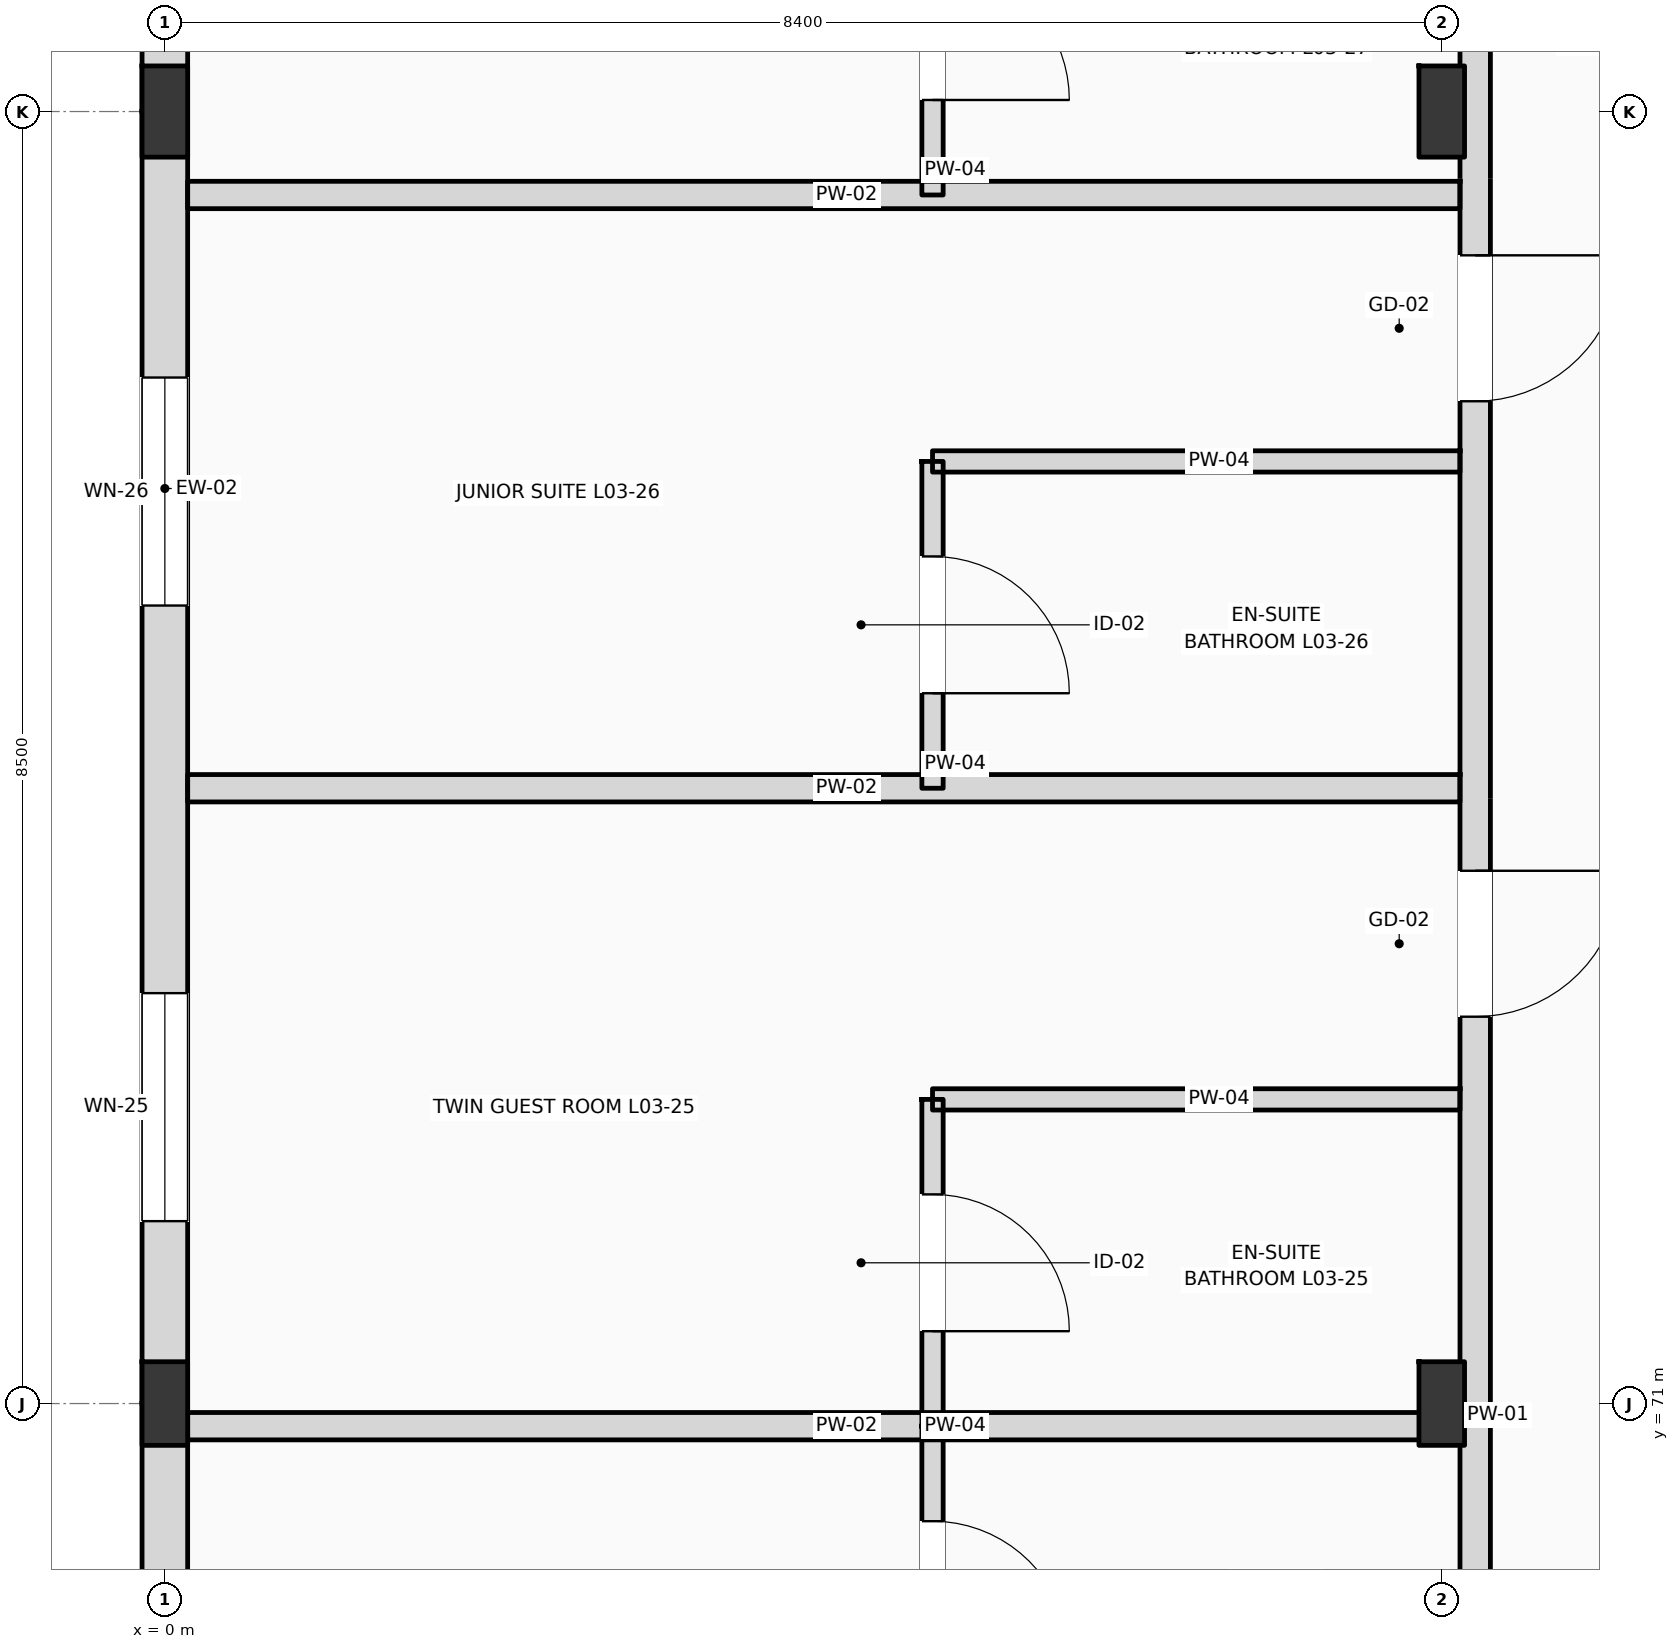
"""IFC4 building model, lengths in metres.
Left out: names, types, materials, properties, quantities, classifications, styles, units other than length and angle.
Written with IfcOpenShell. Run it as: python <this file> out.ifc"""

import sys

from ifc_helpers import new_model, si_unit, direction, frame, frame_2d, origin, origin_2d, place, context, subcontext, project, spatial, rectangle, i_section, extrude, element, fill, save


model = new_model("IFC4")
c1 = context("Model", 3, precision=1e-05, world=origin(), true_north=direction((0.0, 1.0)))
c2 = subcontext(c1, "Body", "Model", "MODEL_VIEW")
j1 = project(units=[si_unit("LENGTHUNIT", "METRE"), si_unit("PLANEANGLEUNIT", "RADIAN")], contexts=[c1])
p1 = place(None, origin())
s1 = spatial("IfcSite", under=j1, at=p1, CompositionType="ELEMENT")
p2 = place(p1, origin())
s2 = spatial("IfcBuilding", under=s1, at=p2, CompositionType="ELEMENT")
p3 = place(p2, frame((0.0, 0.0, 16.2)))
s3 = spatial("IfcBuildingStorey", under=s2, at=p3, CompositionType="ELEMENT", Elevation=16.2)
p4 = place(p3, frame((0.0, 71.0, 0.0), z_axis=(0.0, 0.0, 1.0), x_axis=(1.0, 0.0, 0.0)))
e1 = element("IfcColumn", 1, at=p4, inside=s3, PredefinedType="COLUMN", context=c2, shape_type="SweptSolid", body=[
    extrude(i_section(OverallWidth=0.3, OverallDepth=0.55, WebThickness=0.015, FlangeThickness=0.029, FilletRadius=0.027, at=origin_2d()), origin(), (0.0, 0.0, 1.0), 4.2),
])
p5 = place(p3, frame((0.0, 79.5, 0.0), z_axis=(0.0, 0.0, 1.0), x_axis=(1.0, 0.0, 0.0)))
e2 = element("IfcColumn", 2, at=p5, inside=s3, PredefinedType="COLUMN", context=c2, shape_type="SweptSolid", body=[
    extrude(i_section(OverallWidth=0.3, OverallDepth=0.6, WebThickness=0.015, FlangeThickness=0.03, FilletRadius=0.027, at=origin_2d()), origin(), (0.0, 0.0, 1.0), 4.2),
])
p6 = place(p3, frame((8.4, 71.0, 0.0), z_axis=(0.0, 0.0, 1.0), x_axis=(1.0, 0.0, 0.0)))
e3 = element("IfcColumn", 3, at=p6, inside=s3, PredefinedType="COLUMN", context=c2, shape_type="SweptSolid", body=[
    extrude(i_section(OverallWidth=0.3, OverallDepth=0.55, WebThickness=0.015, FlangeThickness=0.029, FilletRadius=0.027, at=origin_2d()), origin(), (0.0, 0.0, 1.0), 4.2),
])
p7 = place(p3, frame((8.4, 79.5, 0.0), z_axis=(0.0, 0.0, 1.0), x_axis=(1.0, 0.0, 0.0)))
e4 = element("IfcColumn", 4, at=p7, inside=s3, PredefinedType="COLUMN", context=c2, shape_type="SweptSolid", body=[
    extrude(i_section(OverallWidth=0.3, OverallDepth=0.6, WebThickness=0.015, FlangeThickness=0.03, FilletRadius=0.027, at=origin_2d()), origin(), (0.0, 0.0, 1.0), 4.2),
])
p8 = place(p3, frame((0.0, 62.5, 0.0), z_axis=(0.0, 0.0, 1.0), x_axis=(0.0, 1.0, 0.0)))
e5 = element("IfcWall", 5, at=p8, inside=s3, PredefinedType="STANDARD", context=c2, shape_type="SweptSolid", body=[
    extrude(rectangle(XDim=8.5, YDim=0.3, at=frame_2d((4.25, 0.0))), origin(), (0.0, 0.0, 1.0), 3.51),
])
p9 = place(p8, frame((1.674, 0.0, 0.9)))
e6 = element("IfcOpeningElement", 6, at=p9, cuts=e5, PredefinedType="OPENING", context=c2, shape_type="SweptSolid", body=[
    extrude(rectangle(XDim=1.4, YDim=1.7, at=frame_2d((0.7, 0.85))), frame((0.0, 0.16, 0.0), z_axis=(0.0, -1.0, 0.0), x_axis=(1.0, 0.0, 0.0)), (0.0, 0.0, 1.0), 0.32),
])
p10 = place(p8, frame((5.649, 0.0, 0.9)))
e7 = element("IfcOpeningElement", 7, at=p10, cuts=e5, PredefinedType="OPENING", context=c2, shape_type="SweptSolid", body=[
    extrude(rectangle(XDim=1.5, YDim=1.75, at=frame_2d((0.75, 0.875))), frame((0.0, 0.16, 0.0), z_axis=(0.0, -1.0, 0.0), x_axis=(1.0, 0.0, 0.0)), (0.0, 0.0, 1.0), 0.32),
])
p11 = place(p3, frame((0.0, 71.0, 0.0), z_axis=(0.0, 0.0, 1.0), x_axis=(0.0, 1.0, 0.0)))
e8 = element("IfcWall", 8, at=p11, inside=s3, PredefinedType="STANDARD", context=c2, shape_type="SweptSolid", body=[
    extrude(rectangle(XDim=8.5, YDim=0.3, at=frame_2d((4.25, 0.0))), origin(), (0.0, 0.0, 1.0), 3.51),
])
p12 = place(p11, frame((1.2, 0.0, 0.9)))
e9 = element("IfcOpeningElement", 9, at=p12, cuts=e8, PredefinedType="OPENING", context=c2, shape_type="SweptSolid", body=[
    extrude(rectangle(XDim=1.5, YDim=2.3, at=frame_2d((0.75, 1.15))), frame((0.0, 0.16, 0.0), z_axis=(0.0, -1.0, 0.0), x_axis=(1.0, 0.0, 0.0)), (0.0, 0.0, 1.0), 0.32),
])
p13 = place(p11, frame((5.25, 0.0, 0.9)))
e10 = element("IfcOpeningElement", 10, at=p13, cuts=e8, PredefinedType="OPENING", context=c2, shape_type="SweptSolid", body=[
    extrude(rectangle(XDim=1.5, YDim=2.43, at=frame_2d((0.75, 1.215))), frame((0.0, 0.16, 0.0), z_axis=(0.0, -1.0, 0.0), x_axis=(1.0, 0.0, 0.0)), (0.0, 0.0, 1.0), 0.32),
])
p14 = place(p3, frame((0.0, 79.5, 0.0), z_axis=(0.0, 0.0, 1.0), x_axis=(0.0, 1.0, 0.0)))
e11 = element("IfcWall", 11, at=p14, inside=s3, PredefinedType="STANDARD", context=c2, shape_type="SweptSolid", body=[
    extrude(rectangle(XDim=8.5, YDim=0.3, at=frame_2d((4.25, 0.0))), origin(), (0.0, 0.0, 1.0), 3.51),
])
p15 = place(p14, frame((0.799, 0.0, 0.9)))
e12 = element("IfcOpeningElement", 12, at=p15, cuts=e11, PredefinedType="OPENING", context=c2, shape_type="SweptSolid", body=[
    extrude(rectangle(XDim=1.5, YDim=2.43, at=frame_2d((0.75, 1.215))), frame((0.0, 0.16, 0.0), z_axis=(0.0, -1.0, 0.0), x_axis=(1.0, 0.0, 0.0)), (0.0, 0.0, 1.0), 0.32),
])
p16 = place(p14, frame((4.85, 0.0, 0.9)))
e13 = element("IfcOpeningElement", 13, at=p16, cuts=e11, PredefinedType="OPENING", context=c2, shape_type="SweptSolid", body=[
    extrude(rectangle(XDim=1.5, YDim=2.43, at=frame_2d((0.75, 1.215))), frame((0.0, 0.16, 0.0), z_axis=(0.0, -1.0, 0.0), x_axis=(1.0, 0.0, 0.0)), (0.0, 0.0, 1.0), 0.32),
])
p17 = place(p3, frame((8.62, 62.64, 0.0), z_axis=(0.0, 0.0, 1.0), x_axis=(0.0, 1.0, 0.0)))
e14 = element("IfcWall", 14, at=p17, inside=s3, PredefinedType="PARTITIONING", context=c2, shape_type="SweptSolid", body=[
    extrude(rectangle(XDim=32.66, YDim=0.2, at=frame_2d((16.33, 0.0))), origin(), (0.0, 0.0, 1.0), 3.51),
])
p18 = place(p17, frame((2.829, 0.0, 0.0)))
e15 = element("IfcOpeningElement", 15, at=p18, cuts=e14, PredefinedType="OPENING", context=c2, shape_type="SweptSolid", body=[
    extrude(rectangle(XDim=0.96, YDim=2.2, at=frame_2d((0.48, 1.1))), frame((0.0, 0.11, 0.0), z_axis=(0.0, -1.0, 0.0), x_axis=(1.0, 0.0, 0.0)), (0.0, 0.0, 1.0), 0.22),
])
p19 = place(p17, frame((4.704, 0.0, 0.0)))
e16 = element("IfcOpeningElement", 16, at=p19, cuts=e14, PredefinedType="OPENING", context=c2, shape_type="SweptSolid", body=[
    extrude(rectangle(XDim=0.96, YDim=2.2, at=frame_2d((0.48, 1.1))), frame((0.0, 0.11, 0.0), z_axis=(0.0, -1.0, 0.0), x_axis=(1.0, 0.0, 0.0)), (0.0, 0.0, 1.0), 0.22),
])
p20 = place(p17, frame((10.905, 0.0, 0.0)))
e17 = element("IfcOpeningElement", 17, at=p20, cuts=e14, PredefinedType="OPENING", context=c2, shape_type="SweptSolid", body=[
    extrude(rectangle(XDim=0.96, YDim=2.2, at=frame_2d((0.48, 1.1))), frame((0.0, 0.11, 0.0), z_axis=(0.0, -1.0, 0.0), x_axis=(1.0, 0.0, 0.0)), (0.0, 0.0, 1.0), 0.22),
])
p21 = place(p17, frame((14.954, 0.0, 0.0)))
e18 = element("IfcOpeningElement", 18, at=p21, cuts=e14, PredefinedType="OPENING", context=c2, shape_type="SweptSolid", body=[
    extrude(rectangle(XDim=0.96, YDim=2.2, at=frame_2d((0.48, 1.1))), frame((0.0, 0.11, 0.0), z_axis=(0.0, -1.0, 0.0), x_axis=(1.0, 0.0, 0.0)), (0.0, 0.0, 1.0), 0.22),
])
p22 = place(p17, frame((19.004, 0.0, 0.0)))
e19 = element("IfcOpeningElement", 19, at=p22, cuts=e14, PredefinedType="OPENING", context=c2, shape_type="SweptSolid", body=[
    extrude(rectangle(XDim=0.96, YDim=2.2, at=frame_2d((0.48, 1.1))), frame((0.0, 0.11, 0.0), z_axis=(0.0, -1.0, 0.0), x_axis=(1.0, 0.0, 0.0)), (0.0, 0.0, 1.0), 0.22),
])
p23 = place(p17, frame((23.055, 0.0, 0.0)))
e20 = element("IfcOpeningElement", 20, at=p23, cuts=e14, PredefinedType="OPENING", context=c2, shape_type="SweptSolid", body=[
    extrude(rectangle(XDim=0.96, YDim=2.2, at=frame_2d((0.48, 1.1))), frame((0.0, 0.11, 0.0), z_axis=(0.0, -1.0, 0.0), x_axis=(1.0, 0.0, 0.0)), (0.0, 0.0, 1.0), 0.22),
])
p24 = place(p17, frame((27.104, 0.0, 0.0)))
e21 = element("IfcOpeningElement", 21, at=p24, cuts=e14, PredefinedType="OPENING", context=c2, shape_type="SweptSolid", body=[
    extrude(rectangle(XDim=0.96, YDim=2.2, at=frame_2d((0.48, 1.1))), frame((0.0, 0.11, 0.0), z_axis=(0.0, -1.0, 0.0), x_axis=(1.0, 0.0, 0.0)), (0.0, 0.0, 1.0), 0.22),
])
p25 = place(p17, frame((31.179, 0.0, 0.0)))
e22 = element("IfcOpeningElement", 22, at=p25, cuts=e14, PredefinedType="OPENING", context=c2, shape_type="SweptSolid", body=[
    extrude(rectangle(XDim=0.96, YDim=2.2, at=frame_2d((0.48, 1.1))), frame((0.0, 0.11, 0.0), z_axis=(0.0, -1.0, 0.0), x_axis=(1.0, 0.0, 0.0)), (0.0, 0.0, 1.0), 0.22),
])
p26 = place(p3, frame((0.15, 70.851, 0.0), z_axis=(0.0, 0.0, 1.0), x_axis=(1.0, 0.0, 0.0)))
e23 = element("IfcWall", 23, at=p26, inside=s3, PredefinedType="PARTITIONING", context=c2, shape_type="SweptSolid", body=[
    extrude(rectangle(XDim=8.37, YDim=0.18, at=frame_2d((4.185, 0.0))), origin(), (0.0, 0.0, 1.0), 3.36),
])
p27 = place(p3, frame((5.05, 68.701, 0.0), z_axis=(0.0, 0.0, 1.0), x_axis=(0.0, 1.0, 0.0)))
e24 = element("IfcWall", 24, at=p27, inside=s3, PredefinedType="PARTITIONING", context=c2, shape_type="SweptSolid", body=[
    extrude(rectangle(XDim=2.15, YDim=0.14, at=frame_2d((1.075, 0.0))), origin(), (0.0, 0.0, 1.0), 3.92),
])
p28 = place(p27, frame((0.625, 0.0, 0.0)))
e25 = element("IfcOpeningElement", 25, at=p28, cuts=e24, PredefinedType="OPENING", context=c2, shape_type="SweptSolid", body=[
    extrude(rectangle(XDim=0.9, YDim=2.1, at=frame_2d((0.45, 1.05))), frame((0.0, 0.08, 0.0), z_axis=(0.0, -1.0, 0.0), x_axis=(1.0, 0.0, 0.0)), (0.0, 0.0, 1.0), 0.16),
])
p29 = place(p3, frame((0.15, 75.048, 0.0), z_axis=(0.0, 0.0, 1.0), x_axis=(1.0, 0.0, 0.0)))
e26 = element("IfcWall", 26, at=p29, inside=s3, PredefinedType="PARTITIONING", context=c2, shape_type="SweptSolid", body=[
    extrude(rectangle(XDim=8.37, YDim=0.18, at=frame_2d((4.185, 0.0))), origin(), (0.0, 0.0, 1.0), 3.92),
])
p30 = place(p3, frame((5.05, 73.001, 0.0), z_axis=(0.0, 0.0, 1.0), x_axis=(1.0, 0.0, 0.0)))
e27 = element("IfcWall", 27, at=p30, inside=s3, PredefinedType="PARTITIONING", context=c2, shape_type="SweptSolid", body=[
    extrude(rectangle(XDim=3.47, YDim=0.14, at=frame_2d((1.735, 0.0))), origin(), (0.0, 0.0, 1.0), 3.92),
])
p31 = place(p3, frame((5.05, 70.851, 0.0), z_axis=(0.0, 0.0, 1.0), x_axis=(0.0, 1.0, 0.0)))
e28 = element("IfcWall", 28, at=p31, inside=s3, PredefinedType="PARTITIONING", context=c2, shape_type="SweptSolid", body=[
    extrude(rectangle(XDim=2.15, YDim=0.14, at=frame_2d((1.075, 0.0))), origin(), (0.0, 0.0, 1.0), 3.92),
])
p32 = place(p31, frame((0.625, 0.0, 0.0)))
e29 = element("IfcOpeningElement", 29, at=p32, cuts=e28, PredefinedType="OPENING", context=c2, shape_type="SweptSolid", body=[
    extrude(rectangle(XDim=0.9, YDim=2.1, at=frame_2d((0.45, 1.05))), frame((0.0, 0.08, 0.0), z_axis=(0.0, -1.0, 0.0), x_axis=(1.0, 0.0, 0.0)), (0.0, 0.0, 1.0), 0.16),
])
p33 = place(p3, frame((0.15, 78.951, 0.0), z_axis=(0.0, 0.0, 1.0), x_axis=(1.0, 0.0, 0.0)))
e30 = element("IfcWall", 30, at=p33, inside=s3, PredefinedType="PARTITIONING", context=c2, shape_type="SweptSolid", body=[
    extrude(rectangle(XDim=8.37, YDim=0.18, at=frame_2d((4.185, 0.0))), origin(), (0.0, 0.0, 1.0), 3.92),
])
p34 = place(p3, frame((5.05, 77.198, 0.0), z_axis=(0.0, 0.0, 1.0), x_axis=(1.0, 0.0, 0.0)))
e31 = element("IfcWall", 31, at=p34, inside=s3, PredefinedType="PARTITIONING", context=c2, shape_type="SweptSolid", body=[
    extrude(rectangle(XDim=3.47, YDim=0.14, at=frame_2d((1.735, 0.0))), origin(), (0.0, 0.0, 1.0), 3.92),
])
p35 = place(p3, frame((5.05, 75.048, 0.0), z_axis=(0.0, 0.0, 1.0), x_axis=(0.0, 1.0, 0.0)))
e32 = element("IfcWall", 32, at=p35, inside=s3, PredefinedType="PARTITIONING", context=c2, shape_type="SweptSolid", body=[
    extrude(rectangle(XDim=2.15, YDim=0.14, at=frame_2d((1.075, 0.0))), origin(), (0.0, 0.0, 1.0), 3.92),
])
p36 = place(p35, frame((0.625, 0.0, 0.0)))
e33 = element("IfcOpeningElement", 33, at=p36, cuts=e32, PredefinedType="OPENING", context=c2, shape_type="SweptSolid", body=[
    extrude(rectangle(XDim=0.9, YDim=2.1, at=frame_2d((0.45, 1.05))), frame((0.0, 0.08, 0.0), z_axis=(0.0, -1.0, 0.0), x_axis=(1.0, 0.0, 0.0)), (0.0, 0.0, 1.0), 0.16),
])
p37 = place(p3, frame((5.05, 78.951, 0.0), z_axis=(0.0, 0.0, 1.0), x_axis=(0.0, 1.0, 0.0)))
e34 = element("IfcWall", 34, at=p37, inside=s3, PredefinedType="PARTITIONING", context=c2, shape_type="SweptSolid", body=[
    extrude(rectangle(XDim=2.15, YDim=0.14, at=frame_2d((1.075, 0.0))), origin(), (0.0, 0.0, 1.0), 3.92),
])
p38 = place(p37, frame((0.625, 0.0, 0.0)))
e35 = element("IfcOpeningElement", 35, at=p38, cuts=e34, PredefinedType="OPENING", context=c2, shape_type="SweptSolid", body=[
    extrude(rectangle(XDim=0.9, YDim=2.1, at=frame_2d((0.45, 1.05))), frame((0.0, 0.08, 0.0), z_axis=(0.0, -1.0, 0.0), x_axis=(1.0, 0.0, 0.0)), (0.0, 0.0, 1.0), 0.16),
])
p39 = place(p12, origin())
e36 = element("IfcWindow", 36, at=p39, inside=s3, PartitioningType="DOUBLE_PANEL_VERTICAL", PredefinedType="WINDOW", context=c2, shape_type="SweptSolid", body=[
    extrude(rectangle(XDim=1.5, YDim=2.3, at=frame_2d((0.75, 1.15))), frame((0.0, 0.03, 0.0), z_axis=(0.0, -1.0, 0.0), x_axis=(1.0, 0.0, 0.0)), (0.0, 0.0, 1.0), 0.06),
])
fill(e9, e36)
p40 = place(p13, origin())
e37 = element("IfcWindow", 37, at=p40, inside=s3, PartitioningType="DOUBLE_PANEL_VERTICAL", PredefinedType="WINDOW", context=c2, shape_type="SweptSolid", body=[
    extrude(rectangle(XDim=1.5, YDim=2.43, at=frame_2d((0.75, 1.215))), frame((0.0, 0.03, 0.0), z_axis=(0.0, -1.0, 0.0), x_axis=(1.0, 0.0, 0.0)), (0.0, 0.0, 1.0), 0.06),
])
fill(e10, e37)
p41 = place(p28, frame((0.9, 0.0, 0.0), z_axis=(0.0, 0.0, 1.0), x_axis=(-1.0, 0.0, 0.0)))
e38 = element("IfcDoor", 38, at=p41, inside=s3, OperationType="SINGLE_SWING_LEFT", PredefinedType="DOOR", context=c2, shape_type="SweptSolid", body=[
    extrude(rectangle(XDim=0.9, YDim=2.1, at=frame_2d((0.45, 1.05))), frame((0.0, 0.025, 0.0), z_axis=(0.0, -1.0, 0.0), x_axis=(1.0, 0.0, 0.0)), (0.0, 0.0, 1.0), 0.05),
])
fill(e25, e38)
p42 = place(p20, frame((0.96, 0.0, 0.0), z_axis=(0.0, 0.0, 1.0), x_axis=(-1.0, 0.0, 0.0)))
e39 = element("IfcDoor", 39, at=p42, inside=s3, OperationType="SINGLE_SWING_RIGHT", PredefinedType="DOOR", context=c2, shape_type="SweptSolid", body=[
    extrude(rectangle(XDim=0.96, YDim=2.2, at=frame_2d((0.48, 1.1))), frame((0.0, 0.025, 0.0), z_axis=(0.0, -1.0, 0.0), x_axis=(1.0, 0.0, 0.0)), (0.0, 0.0, 1.0), 0.05),
])
fill(e17, e39)
p43 = place(p32, frame((0.9, 0.0, 0.0), z_axis=(0.0, 0.0, 1.0), x_axis=(-1.0, 0.0, 0.0)))
e40 = element("IfcDoor", 40, at=p43, inside=s3, OperationType="SINGLE_SWING_LEFT", PredefinedType="DOOR", context=c2, shape_type="SweptSolid", body=[
    extrude(rectangle(XDim=0.9, YDim=2.1, at=frame_2d((0.45, 1.05))), frame((0.0, 0.025, 0.0), z_axis=(0.0, -1.0, 0.0), x_axis=(1.0, 0.0, 0.0)), (0.0, 0.0, 1.0), 0.05),
])
fill(e29, e40)
p44 = place(p21, frame((0.96, 0.0, 0.0), z_axis=(0.0, 0.0, 1.0), x_axis=(-1.0, 0.0, 0.0)))
e41 = element("IfcDoor", 41, at=p44, inside=s3, OperationType="SINGLE_SWING_RIGHT", PredefinedType="DOOR", context=c2, shape_type="SweptSolid", body=[
    extrude(rectangle(XDim=0.96, YDim=2.2, at=frame_2d((0.48, 1.1))), frame((0.0, 0.025, 0.0), z_axis=(0.0, -1.0, 0.0), x_axis=(1.0, 0.0, 0.0)), (0.0, 0.0, 1.0), 0.05),
])
fill(e18, e41)
p45 = place(p36, frame((0.9, 0.0, 0.0), z_axis=(0.0, 0.0, 1.0), x_axis=(-1.0, 0.0, 0.0)))
e42 = element("IfcDoor", 42, at=p45, inside=s3, OperationType="SINGLE_SWING_LEFT", PredefinedType="DOOR", context=c2, shape_type="SweptSolid", body=[
    extrude(rectangle(XDim=0.9, YDim=2.1, at=frame_2d((0.45, 1.05))), frame((0.0, 0.025, 0.0), z_axis=(0.0, -1.0, 0.0), x_axis=(1.0, 0.0, 0.0)), (0.0, 0.0, 1.0), 0.05),
])
fill(e33, e42)
p46 = place(p38, frame((0.9, 0.0, 0.0), z_axis=(0.0, 0.0, 1.0), x_axis=(-1.0, 0.0, 0.0)))
e43 = element("IfcDoor", 43, at=p46, inside=s3, OperationType="SINGLE_SWING_LEFT", PredefinedType="DOOR", context=c2, shape_type="SweptSolid", body=[
    extrude(rectangle(XDim=0.9, YDim=2.1, at=frame_2d((0.45, 1.05))), frame((0.0, 0.025, 0.0), z_axis=(0.0, -1.0, 0.0), x_axis=(1.0, 0.0, 0.0)), (0.0, 0.0, 1.0), 0.05),
])
fill(e35, e43)
save(model, sys.argv[1])
